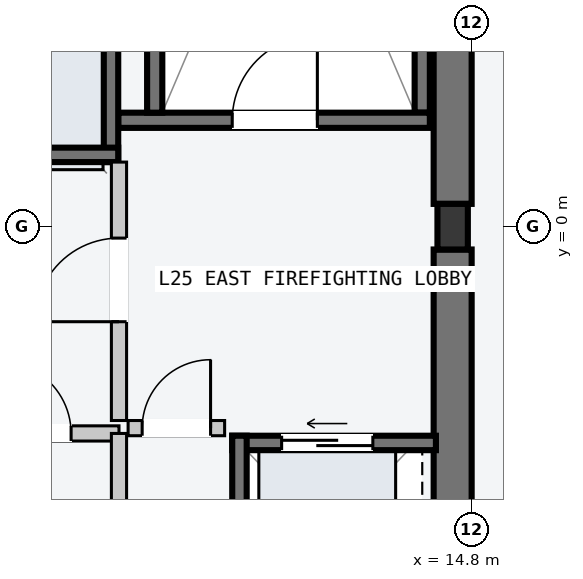
"""IFC4 building model, lengths in metres.
Left out: names, types, materials, properties, quantities, classifications, styles, units other than length and angle.
Written with IfcOpenShell. Run it as: python <this file> out.ifc"""

import sys

from ifc_helpers import new_model, si_unit, direction, frame, frame_2d, origin, origin_2d, place, context, subcontext, project, spatial, rectangle, i_section, extrude, element, fill, save


model = new_model("IFC4")
c1 = context("Model", 3, precision=1e-05, world=origin(), true_north=direction((0.0, 1.0)))
c2 = subcontext(c1, "Body", "Model", "MODEL_VIEW")
j1 = project(units=[si_unit("LENGTHUNIT", "METRE"), si_unit("PLANEANGLEUNIT", "RADIAN")], contexts=[c1])
p1 = place(None, origin())
s1 = spatial("IfcSite", under=j1, at=p1, CompositionType="ELEMENT")
p2 = place(p1, origin())
s2 = spatial("IfcBuilding", under=s1, at=p2, CompositionType="ELEMENT")
p3 = place(p2, frame((0.0, 0.0, 99.0)))
s3 = spatial("IfcBuildingStorey", under=s2, at=p3, CompositionType="ELEMENT", Elevation=99.0)
for number, where, z_axis, x_axis in (
    (1, (14.55, -9.45, -0.2), (0.0, 0.0, 1.0), (0.0, 1.0, 0.0)),
    (2, (14.55, 0.3, -0.2), (0.0, 0.0, 1.0), (0.0, 1.0, 0.0)),
):
    element("IfcWall", number, at=place(p3, frame(where, z_axis=z_axis, x_axis=x_axis)), inside=s3, PredefinedType="SHEAR", context=c2, shape_type="SweptSolid", body=[
        extrude(rectangle(XDim=9.15, YDim=0.5, at=frame_2d((4.575, 0.0))), origin(), (0.0, 0.0, 1.0), 3.6),
    ])
p4 = place(p3, frame((14.15, 1.5, -0.2), z_axis=(0.0, 0.0, 1.0), x_axis=(0.0, 1.0, 0.0)))
e3 = element("IfcWall", 3, at=p4, inside=s3, PredefinedType="SOLIDWALL", context=c2, shape_type="SweptSolid", body=[
    extrude(rectangle(XDim=7.8, YDim=0.2, at=frame_2d((3.9, 0.0))), origin(), (0.0, 0.0, 1.0), 3.6),
])
p5 = place(p3, frame((10.15, 1.4, -0.2), z_axis=(0.0, 0.0, 1.0), x_axis=(1.0, 0.0, 0.0)))
e4 = element("IfcWall", 4, at=p5, inside=s3, PredefinedType="SOLIDWALL", context=c2, shape_type="SweptSolid", body=[
    extrude(rectangle(XDim=4.1, YDim=0.2, at=frame_2d((2.05, 0.0))), origin(), (0.0, 0.0, 1.0), 3.6),
])
p6 = place(p5, frame((1.5, 0.0, 0.2)))
e5 = element("IfcOpeningElement", 5, at=p6, cuts=e4, PredefinedType="OPENING", context=c2, shape_type="SweptSolid", body=[
    extrude(rectangle(XDim=1.12, YDim=2.18, at=frame_2d((0.56, 1.09))), frame((0.0, 0.11, 0.0), z_axis=(0.0, -1.0, 0.0), x_axis=(1.0, 0.0, 0.0)), (0.0, 0.0, 1.0), 0.22),
])
p7 = place(p3, frame((10.63, 1.5, -0.2), z_axis=(0.0, 0.0, 1.0), x_axis=(0.0, 1.0, 0.0)))
e6 = element("IfcWall", 6, at=p7, inside=s3, PredefinedType="SOLIDWALL", context=c2, shape_type="SweptSolid", body=[
    extrude(rectangle(XDim=7.8, YDim=0.2, at=frame_2d((3.9, 0.0))), origin(), (0.0, 0.0, 1.0), 3.6),
])
p8 = place(p3, frame((14.55, 0.0, 0.0), z_axis=(0.0, 0.0, 1.0), x_axis=(1.0, 0.0, 0.0)))
e7 = element("IfcColumn", 7, at=p8, inside=s3, PredefinedType="COLUMN", context=c2, shape_type="SweptSolid", body=[
    extrude(i_section(OverallWidth=0.4, OverallDepth=0.6, WebThickness=0.022, FlangeThickness=0.036, at=origin_2d()), origin(), (0.0, 0.0, 1.0), 3.6),
])
p9 = place(p3, frame((10.055, 0.85, -0.2), z_axis=(0.0, 0.0, 1.0), x_axis=(0.0, 1.0, 0.0)))
e8 = element("IfcWall", 8, at=p9, inside=s3, PredefinedType="SOLIDWALL", context=c2, shape_type="SweptSolid", body=[
    extrude(rectangle(XDim=1.9, YDim=0.19, at=frame_2d((0.95, 0.0))), origin(), (0.0, 0.0, 1.0), 3.6),
])
p10 = place(p3, frame((7.95, 0.945, -0.2), z_axis=(0.0, 0.0, 1.0), x_axis=(1.0, 0.0, 0.0)))
e9 = element("IfcWall", 9, at=p10, inside=s3, PredefinedType="SOLIDWALL", context=c2, shape_type="SweptSolid", body=[
    extrude(rectangle(XDim=2.2, YDim=0.19, at=frame_2d((1.1, 0.0))), origin(), (0.0, 0.0, 1.0), 3.6),
])
p11 = place(p3, frame((11.65, -2.845, -0.2), z_axis=(0.0, 0.0, 1.0), x_axis=(1.0, 0.0, 0.0)))
e10 = element("IfcWall", 10, at=p11, inside=s3, PredefinedType="SOLIDWALL", context=c2, shape_type="SweptSolid", body=[
    extrude(rectangle(XDim=2.68, YDim=0.19, at=frame_2d((1.34, 0.0))), origin(), (0.0, 0.0, 1.0), 3.6),
])
p12 = place(p11, frame((0.65, 0.0, 0.2)))
e11 = element("IfcOpeningElement", 11, at=p12, cuts=e10, PredefinedType="OPENING", context=c2, shape_type="SweptSolid", body=[
    extrude(rectangle(XDim=1.2, YDim=2.2, at=frame_2d((0.6, 1.1))), frame((0.0, 0.105, 0.0), z_axis=(0.0, -1.0, 0.0), x_axis=(1.0, 0.0, 0.0)), (0.0, 0.0, 1.0), 0.21),
])
p13 = place(p3, frame((11.745, -5.35, -0.2), z_axis=(0.0, 0.0, 1.0), x_axis=(0.0, 1.0, 0.0)))
e12 = element("IfcWall", 12, at=p13, inside=s3, PredefinedType="SOLIDWALL", context=c2, shape_type="SweptSolid", body=[
    extrude(rectangle(XDim=2.6, YDim=0.19, at=frame_2d((1.3, 0.0))), origin(), (0.0, 0.0, 1.0), 3.6),
])
p14 = place(p3, frame((10.16, -2.55, 0.0), z_axis=(0.0, 0.0, 1.0), x_axis=(0.0, 1.0, 0.0)))
e13 = element("IfcWall", 13, at=p14, inside=s3, PredefinedType="PARTITIONING", context=c2, shape_type="SweptSolid", body=[
    extrude(rectangle(XDim=3.4, YDim=0.2, at=frame_2d((1.7, 0.0))), origin(), (0.0, 0.0, 1.0), 3.4),
])
p15 = place(p14, frame((1.3, 0.0, 0.0)))
e14 = element("IfcOpeningElement", 14, at=p15, cuts=e13, PredefinedType="OPENING", context=c2, shape_type="SweptSolid", body=[
    extrude(rectangle(XDim=1.1, YDim=2.15, at=frame_2d((0.55, 1.075))), frame((0.0, 0.11, 0.0), z_axis=(0.0, -1.0, 0.0), x_axis=(1.0, 0.0, 0.0)), (0.0, 0.0, 1.0), 0.22),
])
p16 = place(p3, frame((10.28, -2.65, 0.0), z_axis=(0.0, 0.0, 1.0), x_axis=(1.0, 0.0, 0.0)))
e15 = element("IfcWall", 15, at=p16, inside=s3, PredefinedType="PARTITIONING", context=c2, shape_type="SweptSolid", body=[
    extrude(rectangle(XDim=1.27, YDim=0.2, at=frame_2d((0.635, 0.0))), origin(), (0.0, 0.0, 1.0), 3.4),
])
p17 = place(p16, frame((0.185, 0.0, 0.0)))
e16 = element("IfcOpeningElement", 16, at=p17, cuts=e15, PredefinedType="OPENING", context=c2, shape_type="SweptSolid", body=[
    extrude(rectangle(XDim=0.9, YDim=2.15, at=frame_2d((0.45, 1.075))), frame((0.0, 0.11, 0.0), z_axis=(0.0, -1.0, 0.0), x_axis=(1.0, 0.0, 0.0)), (0.0, 0.0, 1.0), 0.22),
])
p18 = place(p3, frame((7.96, -2.72, 0.0), z_axis=(0.0, 0.0, 1.0), x_axis=(1.0, 0.0, 0.0)))
e17 = element("IfcWall", 17, at=p18, inside=s3, PredefinedType="PARTITIONING", context=c2, shape_type="SweptSolid", body=[
    extrude(rectangle(XDim=2.2, YDim=0.2, at=frame_2d((1.1, 0.0))), origin(), (0.0, 0.0, 1.0), 3.4),
])
p19 = place(p18, frame((0.62, 0.0, 0.0)))
e18 = element("IfcOpeningElement", 18, at=p19, cuts=e17, PredefinedType="OPENING", context=c2, shape_type="SweptSolid", body=[
    extrude(rectangle(XDim=0.95, YDim=2.1, at=frame_2d((0.475, 1.05))), frame((0.0, 0.11, 0.0), z_axis=(0.0, -1.0, 0.0), x_axis=(1.0, 0.0, 0.0)), (0.0, 0.0, 1.0), 0.22),
])
p20 = place(p3, frame((10.16, -5.16, 0.0), z_axis=(0.0, 0.0, 1.0), x_axis=(0.0, 1.0, 0.0)))
e19 = element("IfcWall", 19, at=p20, inside=s3, PredefinedType="PARTITIONING", context=c2, shape_type="SweptSolid", body=[
    extrude(rectangle(XDim=2.44, YDim=0.2, at=frame_2d((1.22, 0.0))), origin(), (0.0, 0.0, 1.0), 3.4),
])
p21 = place(p6, origin())
e20 = element("IfcDoor", 20, at=p21, inside=s3, OperationType="SINGLE_SWING_RIGHT", PredefinedType="DOOR", context=c2, shape_type="SweptSolid", body=[
    extrude(rectangle(XDim=1.12, YDim=2.18, at=frame_2d((0.56, 1.09))), frame((0.0, 0.025, 0.0), z_axis=(0.0, -1.0, 0.0), x_axis=(1.0, 0.0, 0.0)), (0.0, 0.0, 1.0), 0.05),
])
fill(e5, e20)
p22 = place(p12, origin())
e21 = element("IfcDoor", 21, at=p22, inside=s3, OperationType="SLIDING_TO_LEFT", PredefinedType="DOOR", context=c2, shape_type="SweptSolid", body=[
    extrude(rectangle(XDim=1.2, YDim=2.2, at=frame_2d((0.6, 1.1))), frame((0.0, 0.025, 0.0), z_axis=(0.0, -1.0, 0.0), x_axis=(1.0, 0.0, 0.0)), (0.0, 0.0, 1.0), 0.05),
])
fill(e11, e21)
p23 = place(p15, origin())
e22 = element("IfcDoor", 22, at=p23, inside=s3, OperationType="SINGLE_SWING_LEFT", PredefinedType="DOOR", context=c2, shape_type="SweptSolid", body=[
    extrude(rectangle(XDim=1.1, YDim=2.15, at=frame_2d((0.55, 1.075))), frame((0.0, 0.025, 0.0), z_axis=(0.0, -1.0, 0.0), x_axis=(1.0, 0.0, 0.0)), (0.0, 0.0, 1.0), 0.05),
])
fill(e14, e22)
p24 = place(p17, origin())
e23 = element("IfcDoor", 23, at=p24, inside=s3, OperationType="SINGLE_SWING_RIGHT", PredefinedType="DOOR", context=c2, shape_type="SweptSolid", body=[
    extrude(rectangle(XDim=0.9, YDim=2.15, at=frame_2d((0.45, 1.075))), frame((0.0, 0.025, 0.0), z_axis=(0.0, -1.0, 0.0), x_axis=(1.0, 0.0, 0.0)), (0.0, 0.0, 1.0), 0.05),
])
fill(e16, e23)
p25 = place(p19, origin())
e24 = element("IfcDoor", 24, at=p25, inside=s3, OperationType="SINGLE_SWING_LEFT", PredefinedType="DOOR", context=c2, shape_type="SweptSolid", body=[
    extrude(rectangle(XDim=0.95, YDim=2.1, at=frame_2d((0.475, 1.05))), frame((0.0, 0.025, 0.0), z_axis=(0.0, -1.0, 0.0), x_axis=(1.0, 0.0, 0.0)), (0.0, 0.0, 1.0), 0.05),
])
fill(e18, e24)
save(model, sys.argv[1])
